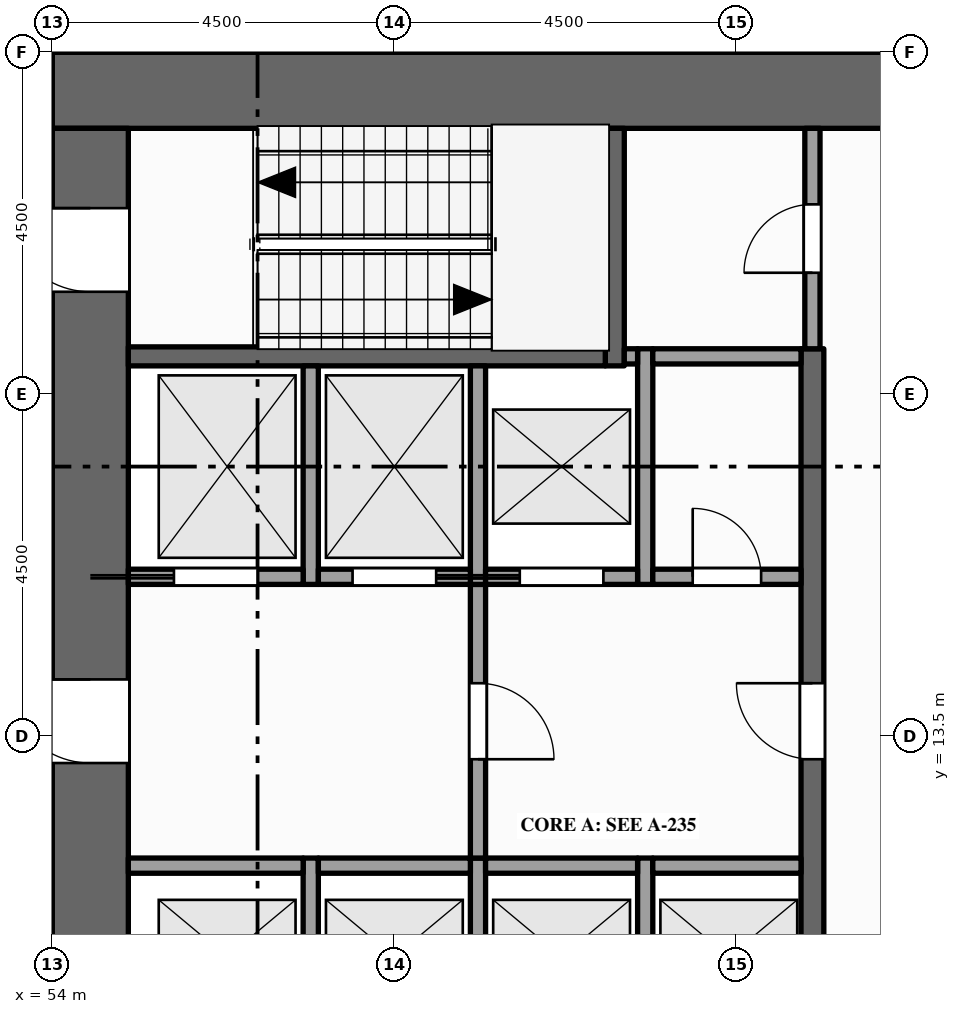
"""IFC4 building model, lengths in metres.
Left out: names, types, materials, properties, quantities, classifications, styles, units other than length and angle.
Written with IfcOpenShell. Run it as: python <this file> out.ifc"""

import sys

from ifc_helpers import new_model, si_unit, direction, frame, frame_2d, origin, place, context, subcontext, project, spatial, rectangle, extrude, element, fill, save


model = new_model("IFC4")
c1 = context("Model", 3, precision=1e-05, world=origin(), true_north=direction((0.0, 1.0)))
c2 = subcontext(c1, "Body", "Model", "MODEL_VIEW")
j1 = project(units=[si_unit("LENGTHUNIT", "METRE"), si_unit("PLANEANGLEUNIT", "RADIAN")], contexts=[c1])
p1 = place(None, origin())
s1 = spatial("IfcSite", under=j1, at=p1, CompositionType="ELEMENT")
p2 = place(p1, origin())
s2 = spatial("IfcBuilding", under=s1, at=p2, CompositionType="ELEMENT")
p3 = place(p2, frame((0.0, 0.0, 195.0)))
s3 = spatial("IfcBuildingStorey", under=s2, at=p3, CompositionType="ELEMENT", Elevation=195.0)
p4 = place(p3, frame((54.0, 22.0, -0.15), z_axis=(0.0, 0.0, 1.0), x_axis=(1.0, 0.0, 0.0)))
e1 = element("IfcWall", 1, at=p4, inside=s3, PredefinedType="SHEAR", context=c2, shape_type="SweptSolid", body=[
    extrude(rectangle(XDim=13.5, YDim=1.0, at=frame_2d((6.75, 0.0))), origin(), (0.0, 0.0, 1.0), 4.0),
])
p5 = place(p3, frame((54.5, 1.0, -0.15), z_axis=(0.0, 0.0, 1.0), x_axis=(0.0, 1.0, 0.0)))
e2 = element("IfcWall", 2, at=p5, inside=s3, PredefinedType="SHEAR", context=c2, shape_type="SweptSolid", body=[
    extrude(rectangle(XDim=20.5, YDim=1.0, at=frame_2d((10.25, 0.0))), origin(), (0.0, 0.0, 1.0), 4.0),
])
p6 = place(p5, frame((6.1, 0.0, 0.15)))
e3 = element("IfcOpeningElement", 3, at=p6, cuts=e2, PredefinedType="OPENING", context=c2, shape_type="SweptSolid", body=[
    extrude(rectangle(XDim=1.8, YDim=2.1, at=frame_2d((0.9, 1.05))), frame((0.0, 0.51, 0.0), z_axis=(0.0, -1.0, 0.0), x_axis=(1.0, 0.0, 0.0)), (0.0, 0.0, 1.0), 1.02),
])
p7 = place(p5, frame((12.15, 0.0, 0.15)))
e4 = element("IfcOpeningElement", 4, at=p7, cuts=e2, PredefinedType="OPENING", context=c2, shape_type="SweptSolid", body=[
    extrude(rectangle(XDim=1.1, YDim=2.1, at=frame_2d((0.55, 1.05))), frame((0.0, 0.51, 0.0), z_axis=(0.0, -1.0, 0.0), x_axis=(1.0, 0.0, 0.0)), (0.0, 0.0, 1.0), 1.02),
])
p8 = place(p5, frame((1.15, 0.0, 0.15)))
e5 = element("IfcOpeningElement", 5, at=p8, cuts=e2, PredefinedType="OPENING", context=c2, shape_type="SweptSolid", body=[
    extrude(rectangle(XDim=1.1, YDim=2.1, at=frame_2d((0.55, 1.05))), frame((0.0, 0.51, 0.0), z_axis=(0.0, -1.0, 0.0), x_axis=(1.0, 0.0, 0.0)), (0.0, 0.0, 1.0), 1.02),
])
p9 = place(p5, frame((18.35, 0.0, 0.15)))
e6 = element("IfcOpeningElement", 6, at=p9, cuts=e2, PredefinedType="OPENING", context=c2, shape_type="SweptSolid", body=[
    extrude(rectangle(XDim=1.1, YDim=2.1, at=frame_2d((0.55, 1.05))), frame((0.0, 0.51, 0.0), z_axis=(0.0, -1.0, 0.0), x_axis=(1.0, 0.0, 0.0)), (0.0, 0.0, 1.0), 1.02),
])
p10 = place(p3, frame((57.4, 9.3, 0.0), z_axis=(0.0, 0.0, 1.0), x_axis=(0.0, 1.0, 0.0)))
e7 = element("IfcWall", 7, at=p10, inside=s3, PredefinedType="SOLIDWALL", context=c2, shape_type="SweptSolid", body=[
    extrude(rectangle(XDim=2.6, YDim=0.2, at=frame_2d((1.3, 0.0))), origin(), (0.0, 0.0, 1.0), 3.85),
])
p11 = place(p3, frame((57.4, 15.5, 0.0), z_axis=(0.0, 0.0, 1.0), x_axis=(0.0, 1.0, 0.0)))
e8 = element("IfcWall", 8, at=p11, inside=s3, PredefinedType="SOLIDWALL", context=c2, shape_type="SweptSolid", body=[
    extrude(rectangle(XDim=2.875, YDim=0.2, at=frame_2d((1.438, 0.0))), origin(), (0.0, 0.0, 1.0), 3.85),
])
p12 = place(p3, frame((59.6, 9.3, 0.0), z_axis=(0.0, 0.0, 1.0), x_axis=(0.0, 1.0, 0.0)))
e9 = element("IfcWall", 9, at=p12, inside=s3, PredefinedType="SOLIDWALL", context=c2, shape_type="SweptSolid", body=[
    extrude(rectangle(XDim=2.6, YDim=0.2, at=frame_2d((1.3, 0.0))), origin(), (0.0, 0.0, 1.0), 3.85),
])
p13 = place(p3, frame((59.6, 11.9, 0.0), z_axis=(0.0, 0.0, 1.0), x_axis=(0.0, 1.0, 0.0)))
e10 = element("IfcWall", 10, at=p13, inside=s3, PredefinedType="PARTITIONING", context=c2, shape_type="SweptSolid", body=[
    extrude(rectangle(XDim=3.6, YDim=0.2, at=frame_2d((1.8, 0.0))), origin(), (0.0, 0.0, 1.0), 3.85),
])
p14 = place(p13, frame((1.3, 0.0, 0.0)))
e11 = element("IfcOpeningElement", 11, at=p14, cuts=e10, PredefinedType="OPENING", context=c2, shape_type="SweptSolid", body=[
    extrude(rectangle(XDim=1.0, YDim=2.1, at=frame_2d((0.5, 1.05))), frame((0.0, 0.11, 0.0), z_axis=(0.0, -1.0, 0.0), x_axis=(1.0, 0.0, 0.0)), (0.0, 0.0, 1.0), 0.22),
])
p15 = place(p3, frame((59.6, 15.5, 0.0), z_axis=(0.0, 0.0, 1.0), x_axis=(0.0, 1.0, 0.0)))
e12 = element("IfcWall", 12, at=p15, inside=s3, PredefinedType="SOLIDWALL", context=c2, shape_type="SweptSolid", body=[
    extrude(rectangle(XDim=2.875, YDim=0.2, at=frame_2d((1.438, 0.0))), origin(), (0.0, 0.0, 1.0), 3.85),
])
p16 = place(p3, frame((61.4, 18.375, 0.0), z_axis=(0.0, 0.0, 1.0), x_axis=(0.0, 1.0, 0.0)))
e13 = element("IfcWall", 13, at=p16, inside=s3, PredefinedType="SHEAR", context=c2, shape_type="SweptSolid", body=[
    extrude(rectangle(XDim=3.125, YDim=0.25, at=frame_2d((1.562, 0.0))), origin(), (0.0, 0.0, 1.0), 3.85),
])
p17 = place(p3, frame((61.8, 9.3, 0.0), z_axis=(0.0, 0.0, 1.0), x_axis=(0.0, 1.0, 0.0)))
e14 = element("IfcWall", 14, at=p17, inside=s3, PredefinedType="SOLIDWALL", context=c2, shape_type="SweptSolid", body=[
    extrude(rectangle(XDim=2.6, YDim=0.2, at=frame_2d((1.3, 0.0))), origin(), (0.0, 0.0, 1.0), 3.85),
])
p18 = place(p3, frame((61.8, 15.5, 0.0), z_axis=(0.0, 0.0, 1.0), x_axis=(0.0, 1.0, 0.0)))
e15 = element("IfcWall", 15, at=p18, inside=s3, PredefinedType="SOLIDWALL", context=c2, shape_type="SweptSolid", body=[
    extrude(rectangle(XDim=3.1, YDim=0.2, at=frame_2d((1.55, 0.0))), origin(), (0.0, 0.0, 1.0), 3.85),
])
p19 = place(p3, frame((64.0, 4.1, 0.0), z_axis=(0.0, 0.0, 1.0), x_axis=(0.0, 1.0, 0.0)))
e16 = element("IfcWall", 16, at=p19, inside=s3, PredefinedType="SHEAR", context=c2, shape_type="SweptSolid", body=[
    extrude(rectangle(XDim=14.5, YDim=0.3, at=frame_2d((7.25, 0.0))), origin(), (0.0, 0.0, 1.0), 3.85),
])
p20 = place(p19, frame((3.4, 0.0, 0.0)))
e17 = element("IfcOpeningElement", 17, at=p20, cuts=e16, PredefinedType="OPENING", context=c2, shape_type="SweptSolid", body=[
    extrude(rectangle(XDim=1.0, YDim=2.1, at=frame_2d((0.5, 1.05))), frame((0.0, 0.16, 0.0), z_axis=(0.0, -1.0, 0.0), x_axis=(1.0, 0.0, 0.0)), (0.0, 0.0, 1.0), 0.32),
])
p21 = place(p19, frame((9.1, 0.0, 0.0)))
e18 = element("IfcOpeningElement", 18, at=p21, cuts=e16, PredefinedType="OPENING", context=c2, shape_type="SweptSolid", body=[
    extrude(rectangle(XDim=1.0, YDim=2.1, at=frame_2d((0.5, 1.05))), frame((0.0, 0.16, 0.0), z_axis=(0.0, -1.0, 0.0), x_axis=(1.0, 0.0, 0.0)), (0.0, 0.0, 1.0), 0.32),
])
p22 = place(p3, frame((64.0, 18.6, 0.0), z_axis=(0.0, 0.0, 1.0), x_axis=(0.0, 1.0, 0.0)))
e19 = element("IfcWall", 19, at=p22, inside=s3, PredefinedType="PARTITIONING", context=c2, shape_type="SweptSolid", body=[
    extrude(rectangle(XDim=2.9, YDim=0.2, at=frame_2d((1.45, 0.0))), origin(), (0.0, 0.0, 1.0), 3.85),
])
p23 = place(p22, frame((1.0, 0.0, 0.0)))
e20 = element("IfcOpeningElement", 20, at=p23, cuts=e19, PredefinedType="OPENING", context=c2, shape_type="SweptSolid", body=[
    extrude(rectangle(XDim=0.9, YDim=2.1, at=frame_2d((0.45, 1.05))), frame((0.0, 0.11, 0.0), z_axis=(0.0, -1.0, 0.0), x_axis=(1.0, 0.0, 0.0)), (0.0, 0.0, 1.0), 0.22),
])
p24 = place(p3, frame((55.0, 11.8, 0.0), z_axis=(0.0, 0.0, 1.0), x_axis=(1.0, 0.0, 0.0)))
e21 = element("IfcWall", 21, at=p24, inside=s3, PredefinedType="SOLIDWALL", context=c2, shape_type="SweptSolid", body=[
    extrude(rectangle(XDim=2.3, YDim=0.2, at=frame_2d((1.15, 0.0))), origin(), (0.0, 0.0, 1.0), 3.85),
])
for number, where, z_axis, x_axis in (
    (22, (57.5, 11.8, 0.0), (0.0, 0.0, 1.0), (1.0, 0.0, 0.0)),
    (23, (59.7, 11.8, 0.0), (0.0, 0.0, 1.0), (1.0, 0.0, 0.0)),
):
    element("IfcWall", number, at=place(p3, frame(where, z_axis=z_axis, x_axis=x_axis)), inside=s3, PredefinedType="SOLIDWALL", context=c2, shape_type="SweptSolid", body=[
        extrude(rectangle(XDim=2.0, YDim=0.2, at=frame_2d((1.0, 0.0))), origin(), (0.0, 0.0, 1.0), 3.85),
    ])
p25 = place(p3, frame((61.9, 11.8, 0.0), z_axis=(0.0, 0.0, 1.0), x_axis=(1.0, 0.0, 0.0)))
e24 = element("IfcWall", 24, at=p25, inside=s3, PredefinedType="SOLIDWALL", context=c2, shape_type="SweptSolid", body=[
    extrude(rectangle(XDim=1.95, YDim=0.2, at=frame_2d((0.975, 0.0))), origin(), (0.0, 0.0, 1.0), 3.85),
])
p26 = place(p3, frame((55.0, 15.6, 0.0), z_axis=(0.0, 0.0, 1.0), x_axis=(1.0, 0.0, 0.0)))
e25 = element("IfcWall", 25, at=p26, inside=s3, PredefinedType="SOLIDWALL", context=c2, shape_type="SweptSolid", body=[
    extrude(rectangle(XDim=2.3, YDim=0.2, at=frame_2d((1.15, 0.0))), origin(), (0.0, 0.0, 1.0), 3.85),
])
p27 = place(p26, frame((0.6, 0.0, 0.012)))
e26 = element("IfcOpeningElement", 26, at=p27, cuts=e25, PredefinedType="OPENING", context=c2, shape_type="SweptSolid", body=[
    extrude(rectangle(XDim=1.1, YDim=2.1, at=frame_2d((0.55, 1.05))), frame((0.0, 0.11, 0.0), z_axis=(0.0, -1.0, 0.0), x_axis=(1.0, 0.0, 0.0)), (0.0, 0.0, 1.0), 0.22),
])
p28 = place(p3, frame((57.5, 15.6, 0.0), z_axis=(0.0, 0.0, 1.0), x_axis=(1.0, 0.0, 0.0)))
e27 = element("IfcWall", 27, at=p28, inside=s3, PredefinedType="SOLIDWALL", context=c2, shape_type="SweptSolid", body=[
    extrude(rectangle(XDim=2.0, YDim=0.2, at=frame_2d((1.0, 0.0))), origin(), (0.0, 0.0, 1.0), 3.85),
])
p29 = place(p28, frame((0.45, 0.0, 0.012)))
e28 = element("IfcOpeningElement", 28, at=p29, cuts=e27, PredefinedType="OPENING", context=c2, shape_type="SweptSolid", body=[
    extrude(rectangle(XDim=1.1, YDim=2.1, at=frame_2d((0.55, 1.05))), frame((0.0, 0.11, 0.0), z_axis=(0.0, -1.0, 0.0), x_axis=(1.0, 0.0, 0.0)), (0.0, 0.0, 1.0), 0.22),
])
p30 = place(p3, frame((59.7, 15.6, 0.0), z_axis=(0.0, 0.0, 1.0), x_axis=(1.0, 0.0, 0.0)))
e29 = element("IfcWall", 29, at=p30, inside=s3, PredefinedType="SOLIDWALL", context=c2, shape_type="SweptSolid", body=[
    extrude(rectangle(XDim=2.0, YDim=0.2, at=frame_2d((1.0, 0.0))), origin(), (0.0, 0.0, 1.0), 3.85),
])
p31 = place(p30, frame((0.45, 0.0, 0.012)))
e30 = element("IfcOpeningElement", 30, at=p31, cuts=e29, PredefinedType="OPENING", context=c2, shape_type="SweptSolid", body=[
    extrude(rectangle(XDim=1.1, YDim=2.1, at=frame_2d((0.55, 1.05))), frame((0.0, 0.11, 0.0), z_axis=(0.0, -1.0, 0.0), x_axis=(1.0, 0.0, 0.0)), (0.0, 0.0, 1.0), 0.22),
])
p32 = place(p3, frame((61.9, 15.6, 0.0), z_axis=(0.0, 0.0, 1.0), x_axis=(1.0, 0.0, 0.0)))
e31 = element("IfcWall", 31, at=p32, inside=s3, PredefinedType="PARTITIONING", context=c2, shape_type="SweptSolid", body=[
    extrude(rectangle(XDim=1.95, YDim=0.2, at=frame_2d((0.975, 0.0))), origin(), (0.0, 0.0, 1.0), 3.85),
])
p33 = place(p32, frame((0.525, 0.0, 0.0)))
e32 = element("IfcOpeningElement", 32, at=p33, cuts=e31, PredefinedType="OPENING", context=c2, shape_type="SweptSolid", body=[
    extrude(rectangle(XDim=0.9, YDim=2.1, at=frame_2d((0.45, 1.05))), frame((0.0, 0.11, 0.0), z_axis=(0.0, -1.0, 0.0), x_axis=(1.0, 0.0, 0.0)), (0.0, 0.0, 1.0), 0.22),
])
p34 = place(p3, frame((55.0, 18.5, 0.0), z_axis=(0.0, 0.0, 1.0), x_axis=(1.0, 0.0, 0.0)))
e33 = element("IfcWall", 33, at=p34, inside=s3, PredefinedType="SHEAR", context=c2, shape_type="SweptSolid", body=[
    extrude(rectangle(XDim=6.275, YDim=0.25, at=frame_2d((3.137, 0.0))), origin(), (0.0, 0.0, 1.0), 3.85),
])
p35 = place(p3, frame((61.525, 18.5, 0.0), z_axis=(0.0, 0.0, 1.0), x_axis=(1.0, 0.0, 0.0)))
e34 = element("IfcWall", 34, at=p35, inside=s3, PredefinedType="SOLIDWALL", context=c2, shape_type="SweptSolid", body=[
    extrude(rectangle(XDim=0.175, YDim=0.2, at=frame_2d((0.087, 0.0))), origin(), (0.0, 0.0, 1.0), 3.85),
])
p36 = place(p3, frame((61.9, 18.5, 0.0), z_axis=(0.0, 0.0, 1.0), x_axis=(1.0, 0.0, 0.0)))
e35 = element("IfcWall", 35, at=p36, inside=s3, PredefinedType="PARTITIONING", context=c2, shape_type="SweptSolid", body=[
    extrude(rectangle(XDim=1.95, YDim=0.2, at=frame_2d((0.975, 0.0))), origin(), (0.0, 0.0, 1.0), 3.85),
])
p37 = place(p27, origin())
e36 = element("IfcDoor", 36, at=p37, inside=s3, OperationType="SLIDING_TO_LEFT", PredefinedType="DOOR", context=c2, shape_type="SweptSolid", body=[
    extrude(rectangle(XDim=1.1, YDim=2.1, at=frame_2d((0.55, 1.05))), frame((0.0, 0.025, 0.0), z_axis=(0.0, -1.0, 0.0), x_axis=(1.0, 0.0, 0.0)), (0.0, 0.0, 1.0), 0.05),
])
fill(e26, e36)
p38 = place(p29, origin())
e37 = element("IfcDoor", 37, at=p38, inside=s3, OperationType="SLIDING_TO_RIGHT", PredefinedType="DOOR", context=c2, shape_type="SweptSolid", body=[
    extrude(rectangle(XDim=1.1, YDim=2.1, at=frame_2d((0.55, 1.05))), frame((0.0, 0.025, 0.0), z_axis=(0.0, -1.0, 0.0), x_axis=(1.0, 0.0, 0.0)), (0.0, 0.0, 1.0), 0.05),
])
fill(e28, e37)
p39 = place(p31, origin())
e38 = element("IfcDoor", 38, at=p39, inside=s3, OperationType="SLIDING_TO_LEFT", PredefinedType="DOOR", context=c2, shape_type="SweptSolid", body=[
    extrude(rectangle(XDim=1.1, YDim=2.1, at=frame_2d((0.55, 1.05))), frame((0.0, 0.025, 0.0), z_axis=(0.0, -1.0, 0.0), x_axis=(1.0, 0.0, 0.0)), (0.0, 0.0, 1.0), 0.05),
])
fill(e30, e38)
p40 = place(p7, origin())
e39 = element("IfcDoor", 39, at=p40, inside=s3, OperationType="SINGLE_SWING_RIGHT", PredefinedType="DOOR", context=c2, shape_type="SweptSolid", body=[
    extrude(rectangle(XDim=1.1, YDim=2.1, at=frame_2d((0.55, 1.05))), frame((0.0, 0.025, 0.0), z_axis=(0.0, -1.0, 0.0), x_axis=(1.0, 0.0, 0.0)), (0.0, 0.0, 1.0), 0.05),
])
fill(e4, e39)
p41 = place(p14, origin())
e40 = element("IfcDoor", 40, at=p41, inside=s3, OperationType="SINGLE_SWING_LEFT", PredefinedType="DOOR", context=c2, shape_type="SweptSolid", body=[
    extrude(rectangle(XDim=1.0, YDim=2.1, at=frame_2d((0.5, 1.05))), frame((0.0, 0.025, 0.0), z_axis=(0.0, -1.0, 0.0), x_axis=(1.0, 0.0, 0.0)), (0.0, 0.0, 1.0), 0.05),
])
fill(e11, e40)
p42 = place(p21, origin())
e41 = element("IfcDoor", 41, at=p42, inside=s3, OperationType="SINGLE_SWING_RIGHT", PredefinedType="DOOR", context=c2, shape_type="SweptSolid", body=[
    extrude(rectangle(XDim=1.0, YDim=2.1, at=frame_2d((0.5, 1.05))), frame((0.0, 0.025, 0.0), z_axis=(0.0, -1.0, 0.0), x_axis=(1.0, 0.0, 0.0)), (0.0, 0.0, 1.0), 0.05),
])
fill(e18, e41)
p43 = place(p9, origin())
e42 = element("IfcDoor", 42, at=p43, inside=s3, OperationType="SINGLE_SWING_RIGHT", PredefinedType="DOOR", context=c2, shape_type="SweptSolid", body=[
    extrude(rectangle(XDim=1.1, YDim=2.1, at=frame_2d((0.55, 1.05))), frame((0.0, 0.025, 0.0), z_axis=(0.0, -1.0, 0.0), x_axis=(1.0, 0.0, 0.0)), (0.0, 0.0, 1.0), 0.05),
])
fill(e6, e42)
p44 = place(p23, origin())
e43 = element("IfcDoor", 43, at=p44, inside=s3, OperationType="SINGLE_SWING_LEFT", PredefinedType="DOOR", context=c2, shape_type="SweptSolid", body=[
    extrude(rectangle(XDim=0.9, YDim=2.1, at=frame_2d((0.45, 1.05))), frame((0.0, 0.025, 0.0), z_axis=(0.0, -1.0, 0.0), x_axis=(1.0, 0.0, 0.0)), (0.0, 0.0, 1.0), 0.05),
])
fill(e20, e43)
p45 = place(p33, origin())
e44 = element("IfcDoor", 44, at=p45, inside=s3, OperationType="SINGLE_SWING_LEFT", PredefinedType="DOOR", context=c2, shape_type="SweptSolid", body=[
    extrude(rectangle(XDim=0.9, YDim=2.1, at=frame_2d((0.45, 1.05))), frame((0.0, 0.025, 0.0), z_axis=(0.0, -1.0, 0.0), x_axis=(1.0, 0.0, 0.0)), (0.0, 0.0, 1.0), 0.05),
])
fill(e32, e44)
save(model, sys.argv[1])
